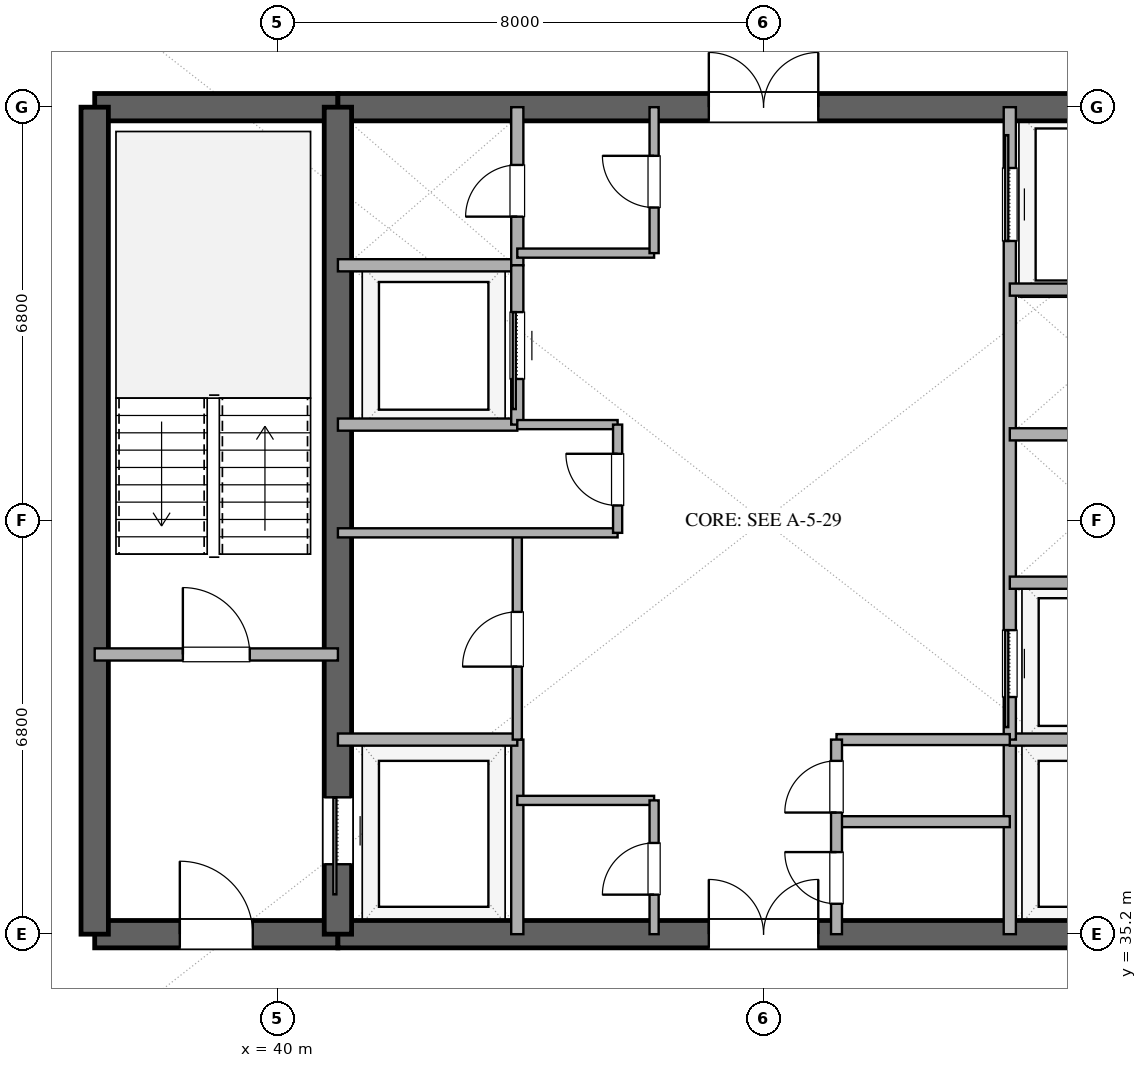
"""IFC4 building model, lengths in metres.
Left out: names, types, materials, properties, quantities, classifications, styles, units other than length and angle.
Written with IfcOpenShell. Run it as: python <this file> out.ifc"""

import sys

from ifc_helpers import new_model, si_unit, direction, frame, frame_2d, origin, place, context, subcontext, project, spatial, rectangle, extrude, element, fill, save


model = new_model("IFC4")
c1 = context("Model", 3, precision=1e-05, world=origin(), true_north=direction((0.0, 1.0)))
c2 = subcontext(c1, "Body", "Model", "MODEL_VIEW")
j1 = project(units=[si_unit("LENGTHUNIT", "METRE"), si_unit("PLANEANGLEUNIT", "RADIAN")], contexts=[c1])
p1 = place(None, origin())
s1 = spatial("IfcSite", under=j1, at=p1, CompositionType="ELEMENT")
p2 = place(p1, origin())
s2 = spatial("IfcBuilding", under=s1, at=p2, CompositionType="ELEMENT")
p3 = place(p2, frame((0.0, 0.0, 190.2)))
s3 = spatial("IfcBuildingStorey", under=s2, at=p3, CompositionType="ELEMENT", Elevation=190.2)
p4 = place(p3, frame((37.0, 35.2, 0.0), z_axis=(0.0, 0.0, 1.0), x_axis=(1.0, 0.0, 0.0)))
e1 = element("IfcWall", 1, at=p4, inside=s3, PredefinedType="SHEAR", context=c2, shape_type="SweptSolid", body=[
    extrude(rectangle(XDim=4.0, YDim=0.45, at=frame_2d((2.0, 0.0))), origin(), (0.0, 0.0, 1.0), 3.38),
])
p5 = place(p4, frame((1.4, 0.0, 0.0)))
e2 = element("IfcOpeningElement", 2, at=p5, cuts=e1, PredefinedType="OPENING", context=c2, shape_type="SweptSolid", body=[
    extrude(rectangle(XDim=1.2, YDim=2.15, at=frame_2d((0.6, 1.075))), frame((0.0, 0.235, 0.0), z_axis=(0.0, -1.0, 0.0), x_axis=(1.0, 0.0, 0.0)), (0.0, 0.0, 1.0), 0.47),
])
p6 = place(p3, frame((41.0, 35.2, 0.0), z_axis=(0.0, 0.0, 1.0), x_axis=(1.0, 0.0, 0.0)))
e3 = element("IfcWall", 3, at=p6, inside=s3, PredefinedType="SHEAR", context=c2, shape_type="SweptSolid", body=[
    extrude(rectangle(XDim=14.0, YDim=0.45, at=frame_2d((7.0, 0.0))), origin(), (0.0, 0.0, 1.0), 3.38),
])
p7 = place(p6, frame((6.1, 0.0, 0.0)))
e4 = element("IfcOpeningElement", 4, at=p7, cuts=e3, PredefinedType="OPENING", context=c2, shape_type="SweptSolid", body=[
    extrude(rectangle(XDim=1.8, YDim=2.25, at=frame_2d((0.9, 1.125))), frame((0.0, 0.235, 0.0), z_axis=(0.0, -1.0, 0.0), x_axis=(1.0, 0.0, 0.0)), (0.0, 0.0, 1.0), 0.47),
])
p8 = place(p3, frame((37.0, 48.8, 0.0), z_axis=(0.0, 0.0, 1.0), x_axis=(1.0, 0.0, 0.0)))
e5 = element("IfcWall", 5, at=p8, inside=s3, PredefinedType="SHEAR", context=c2, shape_type="SweptSolid", body=[
    extrude(rectangle(XDim=4.0, YDim=0.45, at=frame_2d((2.0, 0.0))), origin(), (0.0, 0.0, 1.0), 3.38),
])
p9 = place(p3, frame((41.0, 48.8, 0.0), z_axis=(0.0, 0.0, 1.0), x_axis=(1.0, 0.0, 0.0)))
e6 = element("IfcWall", 6, at=p9, inside=s3, PredefinedType="SHEAR", context=c2, shape_type="SweptSolid", body=[
    extrude(rectangle(XDim=14.0, YDim=0.45, at=frame_2d((7.0, 0.0))), origin(), (0.0, 0.0, 1.0), 3.38),
])
p10 = place(p9, frame((6.1, 0.0, 0.0)))
e7 = element("IfcOpeningElement", 7, at=p10, cuts=e6, PredefinedType="OPENING", context=c2, shape_type="SweptSolid", body=[
    extrude(rectangle(XDim=1.8, YDim=2.25, at=frame_2d((0.9, 1.125))), frame((0.0, 0.235, 0.0), z_axis=(0.0, -1.0, 0.0), x_axis=(1.0, 0.0, 0.0)), (0.0, 0.0, 1.0), 0.47),
])
p11 = place(p3, frame((37.0, 35.2, 0.0), z_axis=(0.0, 0.0, 1.0), x_axis=(0.0, 1.0, 0.0)))
e8 = element("IfcWall", 8, at=p11, inside=s3, PredefinedType="SHEAR", context=c2, shape_type="SweptSolid", body=[
    extrude(rectangle(XDim=13.6, YDim=0.45, at=frame_2d((6.8, 0.0))), origin(), (0.0, 0.0, 1.0), 3.38),
])
p12 = place(p3, frame((41.0, 35.2, 0.0), z_axis=(0.0, 0.0, 1.0), x_axis=(0.0, 1.0, 0.0)))
e9 = element("IfcWall", 9, at=p12, inside=s3, PredefinedType="SHEAR", context=c2, shape_type="SweptSolid", body=[
    extrude(rectangle(XDim=13.6, YDim=0.45, at=frame_2d((6.8, 0.0))), origin(), (0.0, 0.0, 1.0), 3.38),
])
p13 = place(p12, frame((1.15, 0.0, 0.0)))
e10 = element("IfcOpeningElement", 10, at=p13, cuts=e9, PredefinedType="OPENING", context=c2, shape_type="SweptSolid", body=[
    extrude(rectangle(XDim=1.1, YDim=2.2, at=frame_2d((0.55, 1.1))), frame((0.0, 0.235, 0.0), z_axis=(0.0, -1.0, 0.0), x_axis=(1.0, 0.0, 0.0)), (0.0, 0.0, 1.0), 0.47),
])
p14 = place(p3, frame((37.0, 39.8, 0.0), z_axis=(0.0, 0.0, 1.0), x_axis=(1.0, 0.0, 0.0)))
e11 = element("IfcWall", 11, at=p14, inside=s3, PredefinedType="SOLIDWALL", context=c2, shape_type="SweptSolid", body=[
    extrude(rectangle(XDim=4.0, YDim=0.2, at=frame_2d((2.0, 0.0))), origin(), (0.0, 0.0, 1.0), 2.74),
])
p15 = place(p14, frame((1.45, 0.0, 0.0)))
e12 = element("IfcOpeningElement", 12, at=p15, cuts=e11, PredefinedType="OPENING", context=c2, shape_type="SweptSolid", body=[
    extrude(rectangle(XDim=1.1, YDim=2.15, at=frame_2d((0.55, 1.075))), frame((0.0, 0.11, 0.0), z_axis=(0.0, -1.0, 0.0), x_axis=(1.0, 0.0, 0.0)), (0.0, 0.0, 1.0), 0.22),
])
p16 = place(p3, frame((43.95, 35.2, 0.0), z_axis=(0.0, 0.0, 1.0), x_axis=(0.0, 1.0, 0.0)))
e13 = element("IfcWall", 13, at=p16, inside=s3, PredefinedType="SOLIDWALL", context=c2, shape_type="SweptSolid", body=[
    extrude(rectangle(XDim=3.2, YDim=0.2, at=frame_2d((1.6, 0.0))), origin(), (0.0, 0.0, 1.0), 2.74),
])
p17 = place(p3, frame((41.0, 38.4, 0.0), z_axis=(0.0, 0.0, 1.0), x_axis=(1.0, 0.0, 0.0)))
e14 = element("IfcWall", 14, at=p17, inside=s3, PredefinedType="SOLIDWALL", context=c2, shape_type="SweptSolid", body=[
    extrude(rectangle(XDim=2.95, YDim=0.2, at=frame_2d((1.475, 0.0))), origin(), (0.0, 0.0, 1.0), 2.74),
])
p18 = place(p3, frame((52.05, 35.2, 0.0), z_axis=(0.0, 0.0, 1.0), x_axis=(0.0, 1.0, 0.0)))
e15 = element("IfcWall", 15, at=p18, inside=s3, PredefinedType="SOLIDWALL", context=c2, shape_type="SweptSolid", body=[
    extrude(rectangle(XDim=3.2, YDim=0.2, at=frame_2d((1.6, 0.0))), origin(), (0.0, 0.0, 1.0), 2.74),
])
for number, where, z_axis, x_axis in (
    (16, (52.05, 38.4, 0.0), (0.0, 0.0, 1.0), (1.0, 0.0, 0.0)),
    (17, (41.0, 46.2, 0.0), (0.0, 0.0, 1.0), (1.0, 0.0, 0.0)),
):
    element("IfcWall", number, at=place(p3, frame(where, z_axis=z_axis, x_axis=x_axis)), inside=s3, PredefinedType="SOLIDWALL", context=c2, shape_type="SweptSolid", body=[
        extrude(rectangle(XDim=2.95, YDim=0.2, at=frame_2d((1.475, 0.0))), origin(), (0.0, 0.0, 1.0), 2.74),
    ])
p19 = place(p3, frame((43.95, 46.2, 0.0), z_axis=(0.0, 0.0, 1.0), x_axis=(0.0, 1.0, 0.0)))
e18 = element("IfcWall", 18, at=p19, inside=s3, PredefinedType="SOLIDWALL", context=c2, shape_type="SweptSolid", body=[
    extrude(rectangle(XDim=2.6, YDim=0.2, at=frame_2d((1.3, 0.0))), origin(), (0.0, 0.0, 1.0), 2.74),
])
p20 = place(p19, frame((0.8, 0.0, 0.0)))
e19 = element("IfcOpeningElement", 19, at=p20, cuts=e18, PredefinedType="OPENING", context=c2, shape_type="SweptSolid", body=[
    extrude(rectangle(XDim=0.85, YDim=2.15, at=frame_2d((0.425, 1.075))), frame((0.0, 0.11, 0.0), z_axis=(0.0, -1.0, 0.0), x_axis=(1.0, 0.0, 0.0)), (0.0, 0.0, 1.0), 0.22),
])
p21 = place(p3, frame((41.0, 43.58, 0.0), z_axis=(0.0, 0.0, 1.0), x_axis=(1.0, 0.0, 0.0)))
e20 = element("IfcWall", 20, at=p21, inside=s3, PredefinedType="SOLIDWALL", context=c2, shape_type="SweptSolid", body=[
    extrude(rectangle(XDim=2.95, YDim=0.2, at=frame_2d((1.475, 0.0))), origin(), (0.0, 0.0, 1.0), 2.74),
])
p22 = place(p3, frame((43.95, 43.58, 0.0), z_axis=(0.0, 0.0, 1.0), x_axis=(0.0, 1.0, 0.0)))
e21 = element("IfcWall", 21, at=p22, inside=s3, PredefinedType="SOLIDWALL", context=c2, shape_type="SweptSolid", body=[
    extrude(rectangle(XDim=2.62, YDim=0.2, at=frame_2d((1.31, 0.0))), origin(), (0.0, 0.0, 1.0), 2.74),
])
p23 = place(p22, frame((0.75, 0.0, 0.0)))
e22 = element("IfcOpeningElement", 22, at=p23, cuts=e21, PredefinedType="OPENING", context=c2, shape_type="SweptSolid", body=[
    extrude(rectangle(XDim=1.1, YDim=2.2, at=frame_2d((0.55, 1.1))), frame((0.0, 0.11, 0.0), z_axis=(0.0, -1.0, 0.0), x_axis=(1.0, 0.0, 0.0)), (0.0, 0.0, 1.0), 0.22),
])
p24 = place(p3, frame((43.95, 38.4, 0.0), z_axis=(0.0, 0.0, 1.0), x_axis=(0.0, 1.0, 0.0)))
e23 = element("IfcWall", 23, at=p24, inside=s3, PredefinedType="PARTITIONING", context=c2, shape_type="SweptSolid", body=[
    extrude(rectangle(XDim=3.4, YDim=0.15, at=frame_2d((1.7, 0.0))), origin(), (0.0, 0.0, 1.0), 2.74),
])
p25 = place(p24, frame((1.2, 0.0, 0.0)))
e24 = element("IfcOpeningElement", 24, at=p25, cuts=e23, PredefinedType="OPENING", context=c2, shape_type="SweptSolid", body=[
    extrude(rectangle(XDim=0.9, YDim=2.15, at=frame_2d((0.45, 1.075))), frame((0.0, 0.085, 0.0), z_axis=(0.0, -1.0, 0.0), x_axis=(1.0, 0.0, 0.0)), (0.0, 0.0, 1.0), 0.17),
])
p26 = place(p3, frame((41.0, 41.8, 0.0), z_axis=(0.0, 0.0, 1.0), x_axis=(1.0, 0.0, 0.0)))
e25 = element("IfcWall", 25, at=p26, inside=s3, PredefinedType="PARTITIONING", context=c2, shape_type="SweptSolid", body=[
    extrude(rectangle(XDim=4.6, YDim=0.15, at=frame_2d((2.3, 0.0))), origin(), (0.0, 0.0, 1.0), 2.74),
])
p27 = place(p3, frame((43.95, 43.58, 0.0), z_axis=(0.0, 0.0, 1.0), x_axis=(1.0, 0.0, 0.0)))
e26 = element("IfcWall", 26, at=p27, inside=s3, PredefinedType="PARTITIONING", context=c2, shape_type="SweptSolid", body=[
    extrude(rectangle(XDim=1.65, YDim=0.15, at=frame_2d((0.825, 0.0))), origin(), (0.0, 0.0, 1.0), 2.74),
])
p28 = place(p3, frame((45.6, 41.8, 0.0), z_axis=(0.0, 0.0, 1.0), x_axis=(0.0, 1.0, 0.0)))
e27 = element("IfcWall", 27, at=p28, inside=s3, PredefinedType="PARTITIONING", context=c2, shape_type="SweptSolid", body=[
    extrude(rectangle(XDim=1.78, YDim=0.15, at=frame_2d((0.89, 0.0))), origin(), (0.0, 0.0, 1.0), 2.74),
])
p29 = place(p28, frame((0.45, 0.0, 0.0)))
e28 = element("IfcOpeningElement", 28, at=p29, cuts=e27, PredefinedType="OPENING", context=c2, shape_type="SweptSolid", body=[
    extrude(rectangle(XDim=0.85, YDim=2.15, at=frame_2d((0.425, 1.075))), frame((0.0, 0.085, 0.0), z_axis=(0.0, -1.0, 0.0), x_axis=(1.0, 0.0, 0.0)), (0.0, 0.0, 1.0), 0.17),
])
p30 = place(p3, frame((52.05, 38.4, 0.0), z_axis=(0.0, 0.0, 1.0), x_axis=(0.0, 1.0, 0.0)))
e29 = element("IfcWall", 29, at=p30, inside=s3, PredefinedType="SOLIDWALL", context=c2, shape_type="SweptSolid", body=[
    extrude(rectangle(XDim=10.4, YDim=0.2, at=frame_2d((5.2, 0.0))), origin(), (0.0, 0.0, 1.0), 2.74),
])
p31 = place(p30, frame((0.7, 0.0, 0.0)))
e30 = element("IfcOpeningElement", 30, at=p31, cuts=e29, PredefinedType="OPENING", context=c2, shape_type="SweptSolid", body=[
    extrude(rectangle(XDim=1.1, YDim=2.2, at=frame_2d((0.55, 1.1))), frame((0.0, 0.11, 0.0), z_axis=(0.0, -1.0, 0.0), x_axis=(1.0, 0.0, 0.0)), (0.0, 0.0, 1.0), 0.22),
])
p32 = place(p30, frame((8.2, 0.0, 0.0)))
e31 = element("IfcOpeningElement", 31, at=p32, cuts=e29, PredefinedType="OPENING", context=c2, shape_type="SweptSolid", body=[
    extrude(rectangle(XDim=1.2, YDim=2.2, at=frame_2d((0.6, 1.1))), frame((0.0, 0.11, 0.0), z_axis=(0.0, -1.0, 0.0), x_axis=(1.0, 0.0, 0.0)), (0.0, 0.0, 1.0), 0.22),
])
for number, where, z_axis, x_axis in (
    (32, (52.05, 40.98, 0.0), (0.0, 0.0, 1.0), (1.0, 0.0, 0.0)),
    (33, (52.05, 43.42, 0.0), (0.0, 0.0, 1.0), (1.0, 0.0, 0.0)),
    (34, (52.05, 45.8, 0.0), (0.0, 0.0, 1.0), (1.0, 0.0, 0.0)),
):
    element("IfcWall", number, at=place(p3, frame(where, z_axis=z_axis, x_axis=x_axis)), inside=s3, PredefinedType="SOLIDWALL", context=c2, shape_type="SweptSolid", body=[
        extrude(rectangle(XDim=2.95, YDim=0.2, at=frame_2d((1.475, 0.0))), origin(), (0.0, 0.0, 1.0), 2.74),
    ])
p33 = place(p3, frame((43.95, 37.4, 0.0), z_axis=(0.0, 0.0, 1.0), x_axis=(1.0, 0.0, 0.0)))
e35 = element("IfcWall", 35, at=p33, inside=s3, PredefinedType="PARTITIONING", context=c2, shape_type="SweptSolid", body=[
    extrude(rectangle(XDim=2.25, YDim=0.15, at=frame_2d((1.125, 0.0))), origin(), (0.0, 0.0, 1.0), 2.74),
])
p34 = place(p3, frame((46.2, 35.2, 0.0), z_axis=(0.0, 0.0, 1.0), x_axis=(0.0, 1.0, 0.0)))
e36 = element("IfcWall", 36, at=p34, inside=s3, PredefinedType="PARTITIONING", context=c2, shape_type="SweptSolid", body=[
    extrude(rectangle(XDim=2.2, YDim=0.15, at=frame_2d((1.1, 0.0))), origin(), (0.0, 0.0, 1.0), 2.74),
])
p35 = place(p34, frame((0.65, 0.0, 0.0)))
e37 = element("IfcOpeningElement", 37, at=p35, cuts=e36, PredefinedType="OPENING", context=c2, shape_type="SweptSolid", body=[
    extrude(rectangle(XDim=0.85, YDim=2.15, at=frame_2d((0.425, 1.075))), frame((0.0, 0.085, 0.0), z_axis=(0.0, -1.0, 0.0), x_axis=(1.0, 0.0, 0.0)), (0.0, 0.0, 1.0), 0.17),
])
p36 = place(p3, frame((43.95, 46.4, 0.0), z_axis=(0.0, 0.0, 1.0), x_axis=(1.0, 0.0, 0.0)))
e38 = element("IfcWall", 38, at=p36, inside=s3, PredefinedType="PARTITIONING", context=c2, shape_type="SweptSolid", body=[
    extrude(rectangle(XDim=2.25, YDim=0.15, at=frame_2d((1.125, 0.0))), origin(), (0.0, 0.0, 1.0), 2.74),
])
p37 = place(p3, frame((46.2, 46.4, 0.0), z_axis=(0.0, 0.0, 1.0), x_axis=(0.0, 1.0, 0.0)))
e39 = element("IfcWall", 39, at=p37, inside=s3, PredefinedType="PARTITIONING", context=c2, shape_type="SweptSolid", body=[
    extrude(rectangle(XDim=2.4, YDim=0.15, at=frame_2d((1.2, 0.0))), origin(), (0.0, 0.0, 1.0), 2.74),
])
p38 = place(p37, frame((0.75, 0.0, 0.0)))
e40 = element("IfcOpeningElement", 40, at=p38, cuts=e39, PredefinedType="OPENING", context=c2, shape_type="SweptSolid", body=[
    extrude(rectangle(XDim=0.85, YDim=2.15, at=frame_2d((0.425, 1.075))), frame((0.0, 0.085, 0.0), z_axis=(0.0, -1.0, 0.0), x_axis=(1.0, 0.0, 0.0)), (0.0, 0.0, 1.0), 0.17),
])
for number, where, z_axis, x_axis in (
    (41, (49.2, 37.05, 0.0), (0.0, 0.0, 1.0), (1.0, 0.0, 0.0)),
    (42, (49.2, 38.4, 0.0), (0.0, 0.0, 1.0), (1.0, 0.0, 0.0)),
):
    element("IfcWall", number, at=place(p3, frame(where, z_axis=z_axis, x_axis=x_axis)), inside=s3, PredefinedType="PLUMBINGWALL", context=c2, shape_type="SweptSolid", body=[
        extrude(rectangle(XDim=2.85, YDim=0.18, at=frame_2d((1.425, 0.0))), origin(), (0.0, 0.0, 1.0), 2.74),
    ])
p39 = place(p3, frame((49.2, 35.2, 0.0), z_axis=(0.0, 0.0, 1.0), x_axis=(0.0, 1.0, 0.0)))
e43 = element("IfcWall", 43, at=p39, inside=s3, PredefinedType="PLUMBINGWALL", context=c2, shape_type="SweptSolid", body=[
    extrude(rectangle(XDim=3.2, YDim=0.18, at=frame_2d((1.6, 0.0))), origin(), (0.0, 0.0, 1.0), 2.74),
])
p40 = place(p39, frame((0.5, 0.0, 0.0)))
e44 = element("IfcOpeningElement", 44, at=p40, cuts=e43, PredefinedType="OPENING", context=c2, shape_type="SweptSolid", body=[
    extrude(rectangle(XDim=0.85, YDim=2.1, at=frame_2d((0.425, 1.05))), frame((0.0, 0.1, 0.0), z_axis=(0.0, -1.0, 0.0), x_axis=(1.0, 0.0, 0.0)), (0.0, 0.0, 1.0), 0.2),
])
p41 = place(p39, frame((2.0, 0.0, 0.0)))
e45 = element("IfcOpeningElement", 45, at=p41, cuts=e43, PredefinedType="OPENING", context=c2, shape_type="SweptSolid", body=[
    extrude(rectangle(XDim=0.85, YDim=2.15, at=frame_2d((0.425, 1.075))), frame((0.0, 0.1, 0.0), z_axis=(0.0, -1.0, 0.0), x_axis=(1.0, 0.0, 0.0)), (0.0, 0.0, 1.0), 0.2),
])
p42 = place(p13, origin())
e46 = element("IfcDoor", 46, at=p42, inside=s3, OperationType="SLIDING_TO_LEFT", PredefinedType="DOOR", context=c2, shape_type="SweptSolid", body=[
    extrude(rectangle(XDim=1.1, YDim=2.2, at=frame_2d((0.55, 1.1))), frame((0.0, 0.025, 0.0), z_axis=(0.0, -1.0, 0.0), x_axis=(1.0, 0.0, 0.0)), (0.0, 0.0, 1.0), 0.05),
])
fill(e10, e46)
p43 = place(p5, origin())
e47 = element("IfcDoor", 47, at=p43, inside=s3, OperationType="SINGLE_SWING_LEFT", PredefinedType="DOOR", context=c2, shape_type="SweptSolid", body=[
    extrude(rectangle(XDim=1.2, YDim=2.15, at=frame_2d((0.6, 1.075))), frame((0.0, 0.025, 0.0), z_axis=(0.0, -1.0, 0.0), x_axis=(1.0, 0.0, 0.0)), (0.0, 0.0, 1.0), 0.05),
])
fill(e2, e47)
p44 = place(p7, origin())
e48 = element("IfcDoor", 48, at=p44, inside=s3, OperationType="DOUBLE_DOOR_SINGLE_SWING", PredefinedType="DOOR", context=c2, shape_type="SweptSolid", body=[
    extrude(rectangle(XDim=1.8, YDim=2.25, at=frame_2d((0.9, 1.125))), frame((0.0, 0.025, 0.0), z_axis=(0.0, -1.0, 0.0), x_axis=(1.0, 0.0, 0.0)), (0.0, 0.0, 1.0), 0.05),
])
fill(e4, e48)
p45 = place(p10, origin())
e49 = element("IfcDoor", 49, at=p45, inside=s3, OperationType="DOUBLE_DOOR_SINGLE_SWING", PredefinedType="DOOR", context=c2, shape_type="SweptSolid", body=[
    extrude(rectangle(XDim=1.8, YDim=2.25, at=frame_2d((0.9, 1.125))), frame((0.0, 0.025, 0.0), z_axis=(0.0, -1.0, 0.0), x_axis=(1.0, 0.0, 0.0)), (0.0, 0.0, 1.0), 0.05),
])
fill(e7, e49)
p46 = place(p15, origin())
e50 = element("IfcDoor", 50, at=p46, inside=s3, OperationType="SINGLE_SWING_LEFT", PredefinedType="DOOR", context=c2, shape_type="SweptSolid", body=[
    extrude(rectangle(XDim=1.1, YDim=2.15, at=frame_2d((0.55, 1.075))), frame((0.0, 0.025, 0.0), z_axis=(0.0, -1.0, 0.0), x_axis=(1.0, 0.0, 0.0)), (0.0, 0.0, 1.0), 0.05),
])
fill(e12, e50)
p47 = place(p20, origin())
e51 = element("IfcDoor", 51, at=p47, inside=s3, OperationType="SINGLE_SWING_LEFT", PredefinedType="DOOR", context=c2, shape_type="SweptSolid", body=[
    extrude(rectangle(XDim=0.85, YDim=2.15, at=frame_2d((0.425, 1.075))), frame((0.0, 0.025, 0.0), z_axis=(0.0, -1.0, 0.0), x_axis=(1.0, 0.0, 0.0)), (0.0, 0.0, 1.0), 0.05),
])
fill(e19, e51)
p48 = place(p23, origin())
e52 = element("IfcDoor", 52, at=p48, inside=s3, OperationType="SLIDING_TO_LEFT", PredefinedType="DOOR", context=c2, shape_type="SweptSolid", body=[
    extrude(rectangle(XDim=1.1, YDim=2.2, at=frame_2d((0.55, 1.1))), frame((0.0, 0.025, 0.0), z_axis=(0.0, -1.0, 0.0), x_axis=(1.0, 0.0, 0.0)), (0.0, 0.0, 1.0), 0.05),
])
fill(e22, e52)
p49 = place(p25, origin())
e53 = element("IfcDoor", 53, at=p49, inside=s3, OperationType="SINGLE_SWING_LEFT", PredefinedType="DOOR", context=c2, shape_type="SweptSolid", body=[
    extrude(rectangle(XDim=0.9, YDim=2.15, at=frame_2d((0.45, 1.075))), frame((0.0, 0.025, 0.0), z_axis=(0.0, -1.0, 0.0), x_axis=(1.0, 0.0, 0.0)), (0.0, 0.0, 1.0), 0.05),
])
fill(e24, e53)
p50 = place(p29, origin())
e54 = element("IfcDoor", 54, at=p50, inside=s3, OperationType="SINGLE_SWING_RIGHT", PredefinedType="DOOR", context=c2, shape_type="SweptSolid", body=[
    extrude(rectangle(XDim=0.85, YDim=2.15, at=frame_2d((0.425, 1.075))), frame((0.0, 0.025, 0.0), z_axis=(0.0, -1.0, 0.0), x_axis=(1.0, 0.0, 0.0)), (0.0, 0.0, 1.0), 0.05),
])
fill(e28, e54)
p51 = place(p31, origin())
e55 = element("IfcDoor", 55, at=p51, inside=s3, OperationType="SLIDING_TO_LEFT", PredefinedType="DOOR", context=c2, shape_type="SweptSolid", body=[
    extrude(rectangle(XDim=1.1, YDim=2.2, at=frame_2d((0.55, 1.1))), frame((0.0, 0.025, 0.0), z_axis=(0.0, -1.0, 0.0), x_axis=(1.0, 0.0, 0.0)), (0.0, 0.0, 1.0), 0.05),
])
fill(e30, e55)
p52 = place(p32, origin())
e56 = element("IfcDoor", 56, at=p52, inside=s3, OperationType="SLIDING_TO_RIGHT", PredefinedType="DOOR", context=c2, shape_type="SweptSolid", body=[
    extrude(rectangle(XDim=1.2, YDim=2.2, at=frame_2d((0.6, 1.1))), frame((0.0, 0.025, 0.0), z_axis=(0.0, -1.0, 0.0), x_axis=(1.0, 0.0, 0.0)), (0.0, 0.0, 1.0), 0.05),
])
fill(e31, e56)
p53 = place(p35, origin())
e57 = element("IfcDoor", 57, at=p53, inside=s3, OperationType="SINGLE_SWING_LEFT", PredefinedType="DOOR", context=c2, shape_type="SweptSolid", body=[
    extrude(rectangle(XDim=0.85, YDim=2.15, at=frame_2d((0.425, 1.075))), frame((0.0, 0.025, 0.0), z_axis=(0.0, -1.0, 0.0), x_axis=(1.0, 0.0, 0.0)), (0.0, 0.0, 1.0), 0.05),
])
fill(e37, e57)
p54 = place(p38, origin())
e58 = element("IfcDoor", 58, at=p54, inside=s3, OperationType="SINGLE_SWING_RIGHT", PredefinedType="DOOR", context=c2, shape_type="SweptSolid", body=[
    extrude(rectangle(XDim=0.85, YDim=2.15, at=frame_2d((0.425, 1.075))), frame((0.0, 0.025, 0.0), z_axis=(0.0, -1.0, 0.0), x_axis=(1.0, 0.0, 0.0)), (0.0, 0.0, 1.0), 0.05),
])
fill(e40, e58)
p55 = place(p40, origin())
e59 = element("IfcDoor", 59, at=p55, inside=s3, OperationType="SINGLE_SWING_RIGHT", PredefinedType="DOOR", context=c2, shape_type="SweptSolid", body=[
    extrude(rectangle(XDim=0.85, YDim=2.1, at=frame_2d((0.425, 1.05))), frame((0.0, 0.025, 0.0), z_axis=(0.0, -1.0, 0.0), x_axis=(1.0, 0.0, 0.0)), (0.0, 0.0, 1.0), 0.05),
])
fill(e44, e59)
p56 = place(p41, origin())
e60 = element("IfcDoor", 60, at=p56, inside=s3, OperationType="SINGLE_SWING_LEFT", PredefinedType="DOOR", context=c2, shape_type="SweptSolid", body=[
    extrude(rectangle(XDim=0.85, YDim=2.15, at=frame_2d((0.425, 1.075))), frame((0.0, 0.025, 0.0), z_axis=(0.0, -1.0, 0.0), x_axis=(1.0, 0.0, 0.0)), (0.0, 0.0, 1.0), 0.05),
])
fill(e45, e60)
save(model, sys.argv[1])
